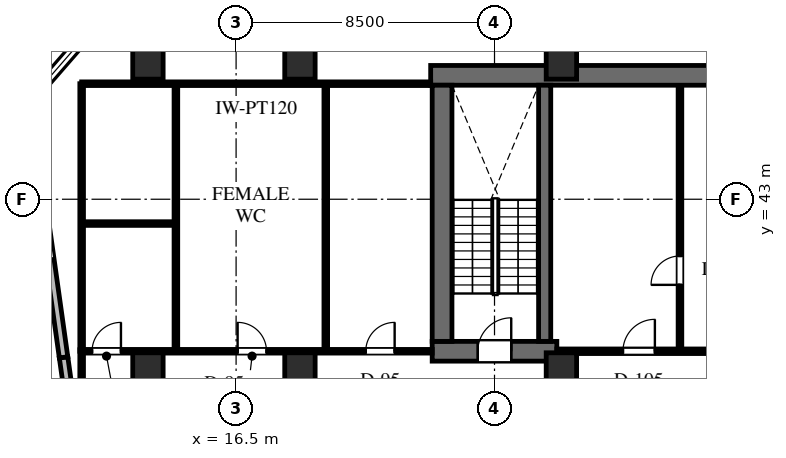
"""IFC4 building model, lengths in metres.
Left out: names, types, materials, properties, quantities, classifications, styles, units other than length and angle.
Written with IfcOpenShell. Run it as: python <this file> out.ifc"""

import sys

from ifc_helpers import new_model, si_unit, direction, frame, frame_2d, origin, origin_2d, place, context, subcontext, project, spatial, rectangle, extrude, element, fill, save


model = new_model("IFC4")
c1 = context("Model", 3, precision=1e-05, world=origin(), true_north=direction((0.0, 1.0)))
c2 = subcontext(c1, "Body", "Model", "MODEL_VIEW")
j1 = project(units=[si_unit("LENGTHUNIT", "METRE"), si_unit("PLANEANGLEUNIT", "RADIAN")], contexts=[c1])
p1 = place(None, origin())
s1 = spatial("IfcSite", under=j1, at=p1, CompositionType="ELEMENT")
p2 = place(p1, origin())
s2 = spatial("IfcBuilding", under=s1, at=p2, CompositionType="ELEMENT")
p3 = place(p2, frame((0.0, 0.0, 104.0)))
s3 = spatial("IfcBuildingStorey", under=s2, at=p3, CompositionType="ELEMENT", Elevation=104.0)
p4 = place(p3, frame((22.9, 47.075, 0.0), z_axis=(0.0, 0.0, 1.0), x_axis=(1.0, 0.0, 0.0)))
e1 = element("IfcWall", 1, at=p4, inside=s3, PredefinedType="SHEAR", context=c2, shape_type="SweptSolid", body=[
    extrude(rectangle(XDim=43.6, YDim=0.65, at=frame_2d((21.8, 0.0))), origin(), (0.0, 0.0, 1.0), 4.0),
])
p5 = place(p3, frame((22.95, 38.0, 0.0), z_axis=(0.0, 0.0, 1.0), x_axis=(1.0, 0.0, 0.0)))
e2 = element("IfcWall", 2, at=p5, inside=s3, PredefinedType="SHEAR", context=c2, shape_type="SweptSolid", body=[
    extrude(rectangle(XDim=4.1, YDim=0.65, at=frame_2d((2.05, 0.0))), origin(), (0.0, 0.0, 1.0), 4.0),
])
p6 = place(p5, frame((1.5, 0.0, 0.0)))
e3 = element("IfcOpeningElement", 3, at=p6, cuts=e2, PredefinedType="OPENING", context=c2, shape_type="SweptSolid", body=[
    extrude(rectangle(XDim=1.1, YDim=2.2, at=frame_2d((0.55, 1.1))), frame((0.0, 0.335, 0.0), z_axis=(0.0, -1.0, 0.0), x_axis=(1.0, 0.0, 0.0)), (0.0, 0.0, 1.0), 0.67),
])
p7 = place(p3, frame((23.275, 38.325, 0.0), z_axis=(0.0, 0.0, 1.0), x_axis=(0.0, 1.0, 0.0)))
e4 = element("IfcWall", 4, at=p7, inside=s3, PredefinedType="SHEAR", context=c2, shape_type="SweptSolid", body=[
    extrude(rectangle(XDim=8.425, YDim=0.65, at=frame_2d((4.212, 0.0))), origin(), (0.0, 0.0, 1.0), 4.0),
])
p8 = place(p3, frame((26.65, 38.325, 0.0), z_axis=(0.0, 0.0, 1.0), x_axis=(0.0, 1.0, 0.0)))
e5 = element("IfcWall", 5, at=p8, inside=s3, PredefinedType="SHEAR", context=c2, shape_type="SweptSolid", body=[
    extrude(rectangle(XDim=8.425, YDim=0.4, at=frame_2d((4.212, 0.0))), origin(), (0.0, 0.0, 1.0), 4.0),
])
for number, where, z_axis, x_axis in (
    (6, (27.2, 37.35, 0.0), (0.0, 0.0, 1.0), (1.0, 0.0, 0.0)),
    (7, (27.2, 47.55, 0.0), (0.0, 0.0, 1.0), (1.0, 0.0, 0.0)),
    (8, (18.6, 37.35, 0.0), (0.0, 0.0, 1.0), (1.0, 0.0, 0.0)),
    (9, (18.6, 47.55, 0.0), (0.0, 0.0, 1.0), (1.0, 0.0, 0.0)),
    (10, (13.6, 37.35, 0.0), (0.0, 0.0, 1.0), (1.0, 0.0, 0.0)),
    (11, (13.6, 47.55, 0.0), (0.0, 0.0, 1.0), (1.0, 0.0, 0.0)),
):
    element("IfcColumn", number, at=place(p3, frame(where, z_axis=z_axis, x_axis=x_axis)), inside=s3, PredefinedType="COLUMN", context=c2, shape_type="SweptSolid", body=[
        extrude(rectangle(XDim=1.0, YDim=1.2, at=origin_2d()), origin(), (0.0, 0.0, 1.0), 4.0),
    ])
p9 = place(p3, frame((14.938, 8.539, 0.0), z_axis=(0.0, 0.0, 1.0), x_axis=(-0.139178114609, 0.990267364106, 0.0)))
e12 = element("IfcWall", 12, at=p9, inside=s3, PredefinedType="STANDARD", context=c2, shape_type="SweptSolid", body=[
    extrude(rectangle(XDim=29.549, YDim=0.28, at=frame_2d((14.774, 0.0))), origin(), (0.0, 0.0, 1.0), 3.75),
])
p10 = place(p9, frame((20.108, 0.0, 0.0)))
e13 = element("IfcOpeningElement", 13, at=p10, cuts=e12, PredefinedType="OPENING", context=c2, shape_type="SweptSolid", body=[
    extrude(rectangle(XDim=1.0, YDim=2.15, at=frame_2d((0.5, 1.075))), frame((0.0, 0.15, 0.0), z_axis=(0.0, -1.0, 0.0), x_axis=(1.0, 0.0, 0.0)), (0.0, 0.0, 1.0), 0.3),
])
p11 = place(p9, frame((9.373, 0.0, 0.65)))
e14 = element("IfcOpeningElement", 14, at=p11, cuts=e12, PredefinedType="OPENING", context=c2, shape_type="SweptSolid", body=[
    extrude(rectangle(XDim=1.8, YDim=2.1, at=frame_2d((0.9, 1.05))), frame((0.0, 0.15, 0.0), z_axis=(0.0, -1.0, 0.0), x_axis=(1.0, 0.0, 0.0)), (0.0, 0.0, 1.0), 0.3),
])
p12 = place(p9, frame((23.658, 0.0, 0.65)))
e15 = element("IfcOpeningElement", 15, at=p12, cuts=e12, PredefinedType="OPENING", context=c2, shape_type="SweptSolid", body=[
    extrude(rectangle(XDim=1.8, YDim=2.1, at=frame_2d((0.9, 1.05))), frame((0.0, 0.15, 0.0), z_axis=(0.0, -1.0, 0.0), x_axis=(1.0, 0.0, 0.0)), (0.0, 0.0, 1.0), 0.3),
])
p13 = place(p3, frame((10.825, 37.8, 0.0), z_axis=(0.0, 0.0, 1.0), x_axis=(-0.139180610108, 0.990267013371, 0.0)))
e16 = element("IfcWall", 16, at=p13, inside=s3, PredefinedType="STANDARD", context=c2, shape_type="SweptSolid", body=[
    extrude(rectangle(XDim=8.467, YDim=0.28, at=frame_2d((4.234, 0.0))), origin(), (0.0, 0.0, 1.0), 3.75),
])
p14 = place(p13, frame((3.273, 0.0, 0.65)))
e17 = element("IfcOpeningElement", 17, at=p14, cuts=e16, PredefinedType="OPENING", context=c2, shape_type="SweptSolid", body=[
    extrude(rectangle(XDim=1.8, YDim=2.1, at=frame_2d((0.9, 1.05))), frame((0.0, 0.15, 0.0), z_axis=(0.0, -1.0, 0.0), x_axis=(1.0, 0.0, 0.0)), (0.0, 0.0, 1.0), 0.3),
])
p15 = place(p3, frame((9.646, 46.185, 0.0), z_axis=(0.0, 0.0, 1.0), x_axis=(0.656070644076, 0.754699483226, 0.0)))
e18 = element("IfcWall", 18, at=p15, inside=s3, PredefinedType="STANDARD", context=c2, shape_type="SweptSolid", body=[
    extrude(rectangle(XDim=2.908, YDim=0.28, at=frame_2d((1.454, 0.0))), origin(), (0.0, 0.0, 1.0), 3.75),
])
p16 = place(p15, frame((0.541, 0.0, 0.65)))
e19 = element("IfcOpeningElement", 19, at=p16, cuts=e18, PredefinedType="OPENING", context=c2, shape_type="SweptSolid", body=[
    extrude(rectangle(XDim=1.8, YDim=2.1, at=frame_2d((0.9, 1.05))), frame((0.0, 0.15, 0.0), z_axis=(0.0, -1.0, 0.0), x_axis=(1.0, 0.0, 0.0)), (0.0, 0.0, 1.0), 0.3),
])
p17 = place(p3, frame((27.05, 38.0, 0.0), z_axis=(0.0, 0.0, 1.0), x_axis=(1.0, 0.0, 0.0)))
e20 = element("IfcWall", 20, at=p17, inside=s3, PredefinedType="PARTITIONING", context=c2, shape_type="SweptSolid", body=[
    extrude(rectangle(XDim=7.95, YDim=0.15, at=frame_2d((3.975, 0.0))), origin(), (0.0, 0.0, 1.0), 2.894),
])
p18 = place(p17, frame((2.175, 0.0, 0.0)))
e21 = element("IfcOpeningElement", 21, at=p18, cuts=e20, PredefinedType="OPENING", context=c2, shape_type="SweptSolid", body=[
    extrude(rectangle(XDim=1.05, YDim=2.2, at=frame_2d((0.525, 1.1))), frame((0.0, 0.085, 0.0), z_axis=(0.0, -1.0, 0.0), x_axis=(1.0, 0.0, 0.0)), (0.0, 0.0, 1.0), 0.17),
])
p19 = place(p3, frame((31.1, 38.068, 0.0), z_axis=(0.0, 0.0, 1.0), x_axis=(0.0, 1.0, 0.0)))
e22 = element("IfcWall", 22, at=p19, inside=s3, PredefinedType="PARTITIONING", context=c2, shape_type="SweptSolid", body=[
    extrude(rectangle(XDim=8.674, YDim=0.12, at=frame_2d((4.337, 0.0))), origin(), (0.0, 0.0, 1.0), 3.75),
])
p20 = place(p19, frame((2.116, 0.0, 0.0)))
e23 = element("IfcOpeningElement", 23, at=p20, cuts=e22, PredefinedType="OPENING", context=c2, shape_type="SweptSolid", body=[
    extrude(rectangle(XDim=0.95, YDim=2.15, at=frame_2d((0.475, 1.075))), frame((0.0, 0.07, 0.0), z_axis=(0.0, -1.0, 0.0), x_axis=(1.0, 0.0, 0.0)), (0.0, 0.0, 1.0), 0.14),
])
p21 = place(p3, frame((11.42, 38.0, 0.0), z_axis=(0.0, 0.0, 1.0), x_axis=(1.0, 0.0, 0.0)))
e24 = element("IfcWall", 24, at=p21, inside=s3, PredefinedType="PARTITIONING", context=c2, shape_type="SweptSolid", body=[
    extrude(rectangle(XDim=11.53, YDim=0.12, at=frame_2d((5.765, 0.0))), origin(), (0.0, 0.0, 1.0), 2.894),
])
p22 = place(p21, frame((0.343, 0.0, 0.0)))
e25 = element("IfcOpeningElement", 25, at=p22, cuts=e24, PredefinedType="OPENING", context=c2, shape_type="SweptSolid", body=[
    extrude(rectangle(XDim=0.95, YDim=2.15, at=frame_2d((0.475, 1.075))), frame((0.0, 0.07, 0.0), z_axis=(0.0, -1.0, 0.0), x_axis=(1.0, 0.0, 0.0)), (0.0, 0.0, 1.0), 0.14),
])
p23 = place(p21, frame((5.13, 0.0, 0.0)))
e26 = element("IfcOpeningElement", 26, at=p23, cuts=e24, PredefinedType="OPENING", context=c2, shape_type="SweptSolid", body=[
    extrude(rectangle(XDim=0.95, YDim=2.15, at=frame_2d((0.475, 1.075))), frame((0.0, 0.07, 0.0), z_axis=(0.0, -1.0, 0.0), x_axis=(1.0, 0.0, 0.0)), (0.0, 0.0, 1.0), 0.14),
])
p24 = place(p21, frame((9.345, 0.0, 0.0)))
e27 = element("IfcOpeningElement", 27, at=p24, cuts=e24, PredefinedType="OPENING", context=c2, shape_type="SweptSolid", body=[
    extrude(rectangle(XDim=0.95, YDim=2.15, at=frame_2d((0.475, 1.075))), frame((0.0, 0.07, 0.0), z_axis=(0.0, -1.0, 0.0), x_axis=(1.0, 0.0, 0.0)), (0.0, 0.0, 1.0), 0.14),
])
p25 = place(p3, frame((11.42, 38.0, 0.0), z_axis=(0.0, 0.0, 1.0), x_axis=(0.0, 1.0, 0.0)))
e28 = element("IfcWall", 28, at=p25, inside=s3, PredefinedType="PARTITIONING", context=c2, shape_type="SweptSolid", body=[
    extrude(rectangle(XDim=8.8, YDim=0.12, at=frame_2d((4.4, 0.0))), origin(), (0.0, 0.0, 1.0), 3.75),
])
p26 = place(p3, frame((11.42, 46.8, 0.0), z_axis=(0.0, 0.0, 1.0), x_axis=(1.0, 0.0, 0.0)))
e29 = element("IfcWall", 29, at=p26, inside=s3, PredefinedType="PARTITIONING", context=c2, shape_type="SweptSolid", body=[
    extrude(rectangle(XDim=11.48, YDim=0.12, at=frame_2d((5.74, 0.0))), origin(), (0.0, 0.0, 1.0), 2.894),
])
for number, where, z_axis, x_axis in (
    (30, (14.52, 38.068, 0.0), (0.0, 0.0, 1.0), (0.0, 1.0, 0.0)),
    (31, (19.45, 38.068, 0.0), (0.0, 0.0, 1.0), (0.0, 1.0, 0.0)),
):
    element("IfcWall", number, at=place(p3, frame(where, z_axis=z_axis, x_axis=x_axis)), inside=s3, PredefinedType="PARTITIONING", context=c2, shape_type="SweptSolid", body=[
        extrude(rectangle(XDim=8.664, YDim=0.12, at=frame_2d((4.332, 0.0))), origin(), (0.0, 0.0, 1.0), 3.75),
    ])
p27 = place(p3, frame((11.488, 42.2, 0.0), z_axis=(0.0, 0.0, 1.0), x_axis=(1.0, 0.0, 0.0)))
e32 = element("IfcWall", 32, at=p27, inside=s3, PredefinedType="PARTITIONING", context=c2, shape_type="SweptSolid", body=[
    extrude(rectangle(XDim=2.964, YDim=0.12, at=frame_2d((1.482, 0.0))), origin(), (0.0, 0.0, 1.0), 2.894),
])
p28 = place(p3, frame((11.42, 34.752, 0.0), z_axis=(0.0, 0.0, 1.0), x_axis=(0.0, 1.0, 0.0)))
e33 = element("IfcWall", 33, at=p28, inside=s3, PredefinedType="PARTITIONING", context=c2, shape_type="SweptSolid", body=[
    extrude(rectangle(XDim=3.298, YDim=0.12, at=frame_2d((1.649, 0.0))), origin(), (0.0, 0.0, 1.0), 3.75),
])
p29 = place(p16, origin())
e34 = element("IfcWindow", 34, at=p29, inside=s3, PartitioningType="SINGLE_PANEL", PredefinedType="WINDOW", context=c2, shape_type="SweptSolid", body=[
    extrude(rectangle(XDim=1.8, YDim=2.1, at=frame_2d((0.9, 1.05))), frame((0.0, 0.03, 0.0), z_axis=(0.0, -1.0, 0.0), x_axis=(1.0, 0.0, 0.0)), (0.0, 0.0, 1.0), 0.06),
])
fill(e19, e34)
p30 = place(p6, origin())
e35 = element("IfcDoor", 35, at=p30, inside=s3, OperationType="SINGLE_SWING_RIGHT", PredefinedType="DOOR", context=c2, shape_type="SweptSolid", body=[
    extrude(rectangle(XDim=1.1, YDim=2.2, at=frame_2d((0.55, 1.1))), frame((0.0, 0.025, 0.0), z_axis=(0.0, -1.0, 0.0), x_axis=(1.0, 0.0, 0.0)), (0.0, 0.0, 1.0), 0.05),
])
fill(e3, e35)
p31 = place(p18, origin())
e36 = element("IfcDoor", 36, at=p31, inside=s3, OperationType="SINGLE_SWING_RIGHT", PredefinedType="DOOR", context=c2, shape_type="SweptSolid", body=[
    extrude(rectangle(XDim=1.05, YDim=2.2, at=frame_2d((0.525, 1.1))), frame((0.0, 0.025, 0.0), z_axis=(0.0, -1.0, 0.0), x_axis=(1.0, 0.0, 0.0)), (0.0, 0.0, 1.0), 0.05),
])
fill(e21, e36)
p32 = place(p20, origin())
e37 = element("IfcDoor", 37, at=p32, inside=s3, OperationType="SINGLE_SWING_LEFT", PredefinedType="DOOR", context=c2, shape_type="SweptSolid", body=[
    extrude(rectangle(XDim=0.95, YDim=2.15, at=frame_2d((0.475, 1.075))), frame((0.0, 0.025, 0.0), z_axis=(0.0, -1.0, 0.0), x_axis=(1.0, 0.0, 0.0)), (0.0, 0.0, 1.0), 0.05),
])
fill(e23, e37)
p33 = place(p22, origin())
e38 = element("IfcDoor", 38, at=p33, inside=s3, OperationType="SINGLE_SWING_RIGHT", PredefinedType="DOOR", context=c2, shape_type="SweptSolid", body=[
    extrude(rectangle(XDim=0.95, YDim=2.15, at=frame_2d((0.475, 1.075))), frame((0.0, 0.025, 0.0), z_axis=(0.0, -1.0, 0.0), x_axis=(1.0, 0.0, 0.0)), (0.0, 0.0, 1.0), 0.05),
])
fill(e25, e38)
p34 = place(p23, origin())
e39 = element("IfcDoor", 39, at=p34, inside=s3, OperationType="SINGLE_SWING_LEFT", PredefinedType="DOOR", context=c2, shape_type="SweptSolid", body=[
    extrude(rectangle(XDim=0.95, YDim=2.15, at=frame_2d((0.475, 1.075))), frame((0.0, 0.025, 0.0), z_axis=(0.0, -1.0, 0.0), x_axis=(1.0, 0.0, 0.0)), (0.0, 0.0, 1.0), 0.05),
])
fill(e26, e39)
p35 = place(p24, origin())
e40 = element("IfcDoor", 40, at=p35, inside=s3, OperationType="SINGLE_SWING_RIGHT", PredefinedType="DOOR", context=c2, shape_type="SweptSolid", body=[
    extrude(rectangle(XDim=0.95, YDim=2.15, at=frame_2d((0.475, 1.075))), frame((0.0, 0.025, 0.0), z_axis=(0.0, -1.0, 0.0), x_axis=(1.0, 0.0, 0.0)), (0.0, 0.0, 1.0), 0.05),
])
fill(e27, e40)
save(model, sys.argv[1])
